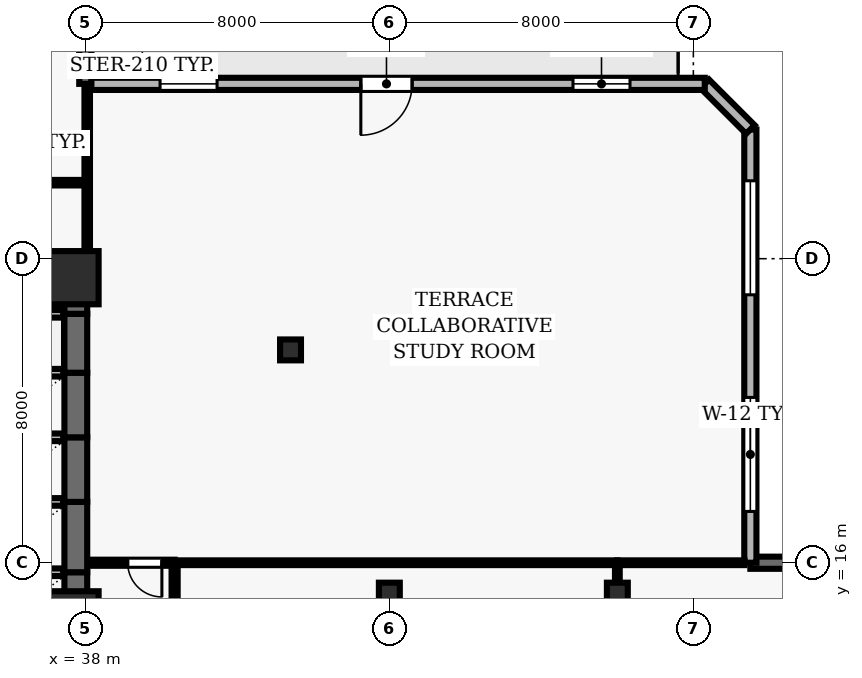
"""IFC4 building model, lengths in metres.
Left out: names, types, materials, properties, quantities, classifications, styles, units other than length and angle.
Written with IfcOpenShell. Run it as: python <this file> out.ifc"""

import sys

from ifc_helpers import new_model, si_unit, direction, frame, frame_2d, origin, origin_2d, place, context, subcontext, project, spatial, rectangle, hollow_rectangle, extrude, element, fill, save


model = new_model("IFC4")
c1 = context("Model", 3, precision=1e-05, world=origin(), true_north=direction((0.0, 1.0)))
c2 = subcontext(c1, "Body", "Model", "MODEL_VIEW")
j1 = project(units=[si_unit("LENGTHUNIT", "METRE"), si_unit("PLANEANGLEUNIT", "RADIAN")], contexts=[c1])
p1 = place(None, origin())
s1 = spatial("IfcSite", under=j1, at=p1, CompositionType="ELEMENT")
p2 = place(p1, origin())
s2 = spatial("IfcBuilding", under=s1, at=p2, CompositionType="ELEMENT")
p3 = place(p2, frame((0.0, 0.0, 31.0)))
s3 = spatial("IfcBuildingStorey", under=s2, at=p3, CompositionType="ELEMENT", Elevation=31.0)
for number, where, z_axis, x_axis in (
    (1, (37.65, 14.55, 0.0), (0.0, 0.0, 1.0), (1.0, 0.0, 0.0)),
    (2, (37.65, 23.5, 0.0), (0.0, 0.0, 1.0), (1.0, 0.0, 0.0)),
):
    element("IfcColumn", number, at=place(p3, frame(where, z_axis=z_axis, x_axis=x_axis)), inside=s3, PredefinedType="COLUMN", context=c2, shape_type="SweptSolid", body=[
        extrude(rectangle(XDim=1.4, YDim=1.4, at=origin_2d()), origin(), (0.0, 0.0, 1.0), 3.9),
    ])
for number, where, z_axis, x_axis in (
    (3, (46.0, 15.2, 0.0), (0.0, 0.0, 1.0), (1.0, 0.0, 0.0)),
    (4, (52.0, 15.2, 0.0), (0.0, 0.0, 1.0), (1.0, 0.0, 0.0)),
    (5, (43.4, 21.6, 0.0), (0.0, 0.0, 1.0), (1.0, 0.0, 0.0)),
):
    element("IfcColumn", number, at=place(p3, frame(where, z_axis=z_axis, x_axis=x_axis)), inside=s3, PredefinedType="COLUMN", context=c2, shape_type="SweptSolid", body=[
        extrude(hollow_rectangle(XDim=0.55, YDim=0.55, WallThickness=0.025, at=origin_2d()), origin(), (0.0, 0.0, 1.0), 3.9),
    ])
p4 = place(p3, frame((73.5, 16.0, 0.0), z_axis=(0.0, 0.0, 1.0), x_axis=(-1.0, 0.0, 0.0)))
e6 = element("IfcWall", 6, at=p4, inside=s3, PredefinedType="SOLIDWALL", context=c2, shape_type="SweptSolid", body=[
    extrude(rectangle(XDim=18.0, YDim=0.32, at=frame_2d((9.0, 0.0))), origin(), (0.0, 0.0, 1.0), 3.69),
])
p5 = place(p4, frame((7.3, 0.0, 0.0)))
e7 = element("IfcOpeningElement", 7, at=p5, cuts=e6, PredefinedType="OPENING", context=c2, shape_type="SweptSolid", body=[
    extrude(rectangle(XDim=1.0, YDim=2.2, at=frame_2d((0.5, 1.1))), frame((0.0, 0.17, 0.0), z_axis=(0.0, -1.0, 0.0), x_axis=(1.0, 0.0, 0.0)), (0.0, 0.0, 1.0), 0.34),
])
p6 = place(p4, frame((1.8, 0.0, 0.9)))
e8 = element("IfcOpeningElement", 8, at=p6, cuts=e6, PredefinedType="OPENING", context=c2, shape_type="SweptSolid", body=[
    extrude(rectangle(XDim=2.4, YDim=2.2, at=frame_2d((1.2, 1.1))), frame((0.0, 0.17, 0.0), z_axis=(0.0, -1.0, 0.0), x_axis=(1.0, 0.0, 0.0)), (0.0, 0.0, 1.0), 0.34),
])
p7 = place(p3, frame((55.5, 16.0, 0.0), z_axis=(0.0, 0.0, 1.0), x_axis=(0.0, 1.0, 0.0)))
e9 = element("IfcWall", 9, at=p7, inside=s3, PredefinedType="SOLIDWALL", context=c2, shape_type="SweptSolid", body=[
    extrude(rectangle(XDim=11.4, YDim=0.32, at=frame_2d((5.7, 0.0))), origin(), (0.0, 0.0, 1.0), 3.69),
])
p8 = place(p7, frame((1.35, 0.0, 0.9)))
e10 = element("IfcOpeningElement", 10, at=p8, cuts=e9, PredefinedType="OPENING", context=c2, shape_type="SweptSolid", body=[
    extrude(rectangle(XDim=3.0, YDim=2.2, at=frame_2d((1.5, 1.1))), frame((0.0, 0.17, 0.0), z_axis=(0.0, -1.0, 0.0), x_axis=(1.0, 0.0, 0.0)), (0.0, 0.0, 1.0), 0.34),
])
p9 = place(p7, frame((7.05, 0.0, 0.9)))
e11 = element("IfcOpeningElement", 11, at=p9, cuts=e9, PredefinedType="OPENING", context=c2, shape_type="SweptSolid", body=[
    extrude(rectangle(XDim=3.0, YDim=2.2, at=frame_2d((1.5, 1.1))), frame((0.0, 0.17, 0.0), z_axis=(0.0, -1.0, 0.0), x_axis=(1.0, 0.0, 0.0)), (0.0, 0.0, 1.0), 0.34),
])
p10 = place(p3, frame((55.5, 27.4, 0.0), z_axis=(0.0, 0.0, 1.0), x_axis=(-0.707034851297, 0.707178703759, 0.0)))
e12 = element("IfcWall", 12, at=p10, inside=s3, PredefinedType="SOLIDWALL", context=c2, shape_type="SweptSolid", body=[
    extrude(rectangle(XDim=1.697, YDim=0.32, at=frame_2d((0.849, 0.0))), origin(), (0.0, 0.0, 1.0), 3.69),
])
p11 = place(p3, frame((54.3, 28.6, 0.0), z_axis=(0.0, 0.0, 1.0), x_axis=(-1.0, 0.0, 0.0)))
e13 = element("IfcWall", 13, at=p11, inside=s3, PredefinedType="SOLIDWALL", context=c2, shape_type="SweptSolid", body=[
    extrude(rectangle(XDim=16.3, YDim=0.32, at=frame_2d((8.15, 0.0))), origin(), (0.0, 0.0, 1.0), 3.69),
])
p12 = place(p11, frame((7.7, 0.0, 0.0)))
e14 = element("IfcOpeningElement", 14, at=p12, cuts=e13, PredefinedType="OPENING", context=c2, shape_type="SweptSolid", body=[
    extrude(rectangle(XDim=1.35, YDim=2.2, at=frame_2d((0.675, 1.1))), frame((0.0, 0.17, 0.0), z_axis=(0.0, -1.0, 0.0), x_axis=(1.0, 0.0, 0.0)), (0.0, 0.0, 1.0), 0.34),
])
p13 = place(p11, frame((1.967, 0.0, 0.9)))
e15 = element("IfcOpeningElement", 15, at=p13, cuts=e13, PredefinedType="OPENING", context=c2, shape_type="SweptSolid", body=[
    extrude(rectangle(XDim=1.5, YDim=1.6, at=frame_2d((0.75, 0.8))), frame((0.0, 0.17, 0.0), z_axis=(0.0, -1.0, 0.0), x_axis=(1.0, 0.0, 0.0)), (0.0, 0.0, 1.0), 0.34),
])
p14 = place(p11, frame((12.833, 0.0, 0.9)))
e16 = element("IfcOpeningElement", 16, at=p14, cuts=e13, PredefinedType="OPENING", context=c2, shape_type="SweptSolid", body=[
    extrude(rectangle(XDim=1.5, YDim=1.6, at=frame_2d((0.75, 0.8))), frame((0.0, 0.17, 0.0), z_axis=(0.0, -1.0, 0.0), x_axis=(1.0, 0.0, 0.0)), (0.0, 0.0, 1.0), 0.34),
])
p15 = place(p3, frame((38.0, 28.6, 0.0), z_axis=(0.0, 0.0, 1.0), x_axis=(0.0, 1.0, 0.0)))
e17 = element("IfcWall", 17, at=p15, inside=s3, PredefinedType="SOLIDWALL", context=c2, shape_type="SweptSolid", body=[
    extrude(rectangle(XDim=22.9, YDim=0.32, at=frame_2d((11.45, 0.0))), origin(), (0.0, 0.0, 1.0), 3.69),
])
p16 = place(p15, frame((9.35, 0.0, 0.0)))
e18 = element("IfcOpeningElement", 18, at=p16, cuts=e17, PredefinedType="OPENING", context=c2, shape_type="SweptSolid", body=[
    extrude(rectangle(XDim=1.0, YDim=2.2, at=frame_2d((0.5, 1.1))), frame((0.0, 0.17, 0.0), z_axis=(0.0, -1.0, 0.0), x_axis=(1.0, 0.0, 0.0)), (0.0, 0.0, 1.0), 0.34),
])
p17 = place(p15, frame((1.962, 0.0, 0.9)))
e19 = element("IfcOpeningElement", 19, at=p17, cuts=e17, PredefinedType="OPENING", context=c2, shape_type="SweptSolid", body=[
    extrude(rectangle(XDim=1.8, YDim=1.6, at=frame_2d((0.9, 0.8))), frame((0.0, 0.17, 0.0), z_axis=(0.0, -1.0, 0.0), x_axis=(1.0, 0.0, 0.0)), (0.0, 0.0, 1.0), 0.34),
])
p18 = place(p15, frame((13.412, 0.0, 0.9)))
e20 = element("IfcOpeningElement", 20, at=p18, cuts=e17, PredefinedType="OPENING", context=c2, shape_type="SweptSolid", body=[
    extrude(rectangle(XDim=1.8, YDim=1.6, at=frame_2d((0.9, 0.8))), frame((0.0, 0.17, 0.0), z_axis=(0.0, -1.0, 0.0), x_axis=(1.0, 0.0, 0.0)), (0.0, 0.0, 1.0), 0.34),
])
p19 = place(p15, frame((19.137, 0.0, 0.9)))
e21 = element("IfcOpeningElement", 21, at=p19, cuts=e17, PredefinedType="OPENING", context=c2, shape_type="SweptSolid", body=[
    extrude(rectangle(XDim=1.8, YDim=1.6, at=frame_2d((0.9, 0.8))), frame((0.0, 0.17, 0.0), z_axis=(0.0, -1.0, 0.0), x_axis=(1.0, 0.0, 0.0)), (0.0, 0.0, 1.0), 0.34),
])
p20 = place(p3, frame((37.75, 13.9, 0.0), z_axis=(0.0, 0.0, 1.0), x_axis=(0.0, 1.0, 0.0)))
e22 = element("IfcWall", 22, at=p20, inside=s3, PredefinedType="SHEAR", context=c2, shape_type="SweptSolid", body=[
    extrude(rectangle(XDim=1.85, YDim=0.6, at=frame_2d((0.925, 0.0))), origin(), (0.0, 0.0, 1.0), 3.69),
])
p21 = place(p3, frame((37.42, 15.75, 0.0), z_axis=(0.0, 0.0, 1.0), x_axis=(-1.0, 0.0, 0.0)))
e23 = element("IfcWall", 23, at=p21, inside=s3, PredefinedType="SOLIDWALL", context=c2, shape_type="SweptSolid", body=[
    extrude(rectangle(XDim=2.14, YDim=0.2, at=frame_2d((1.07, 0.0))), origin(), (0.0, 0.0, 1.0), 3.69),
])
p22 = place(p3, frame((37.75, 15.75, 0.0), z_axis=(0.0, 0.0, 1.0), x_axis=(0.0, 1.0, 0.0)))
e24 = element("IfcWall", 24, at=p22, inside=s3, PredefinedType="SHEAR", context=c2, shape_type="SweptSolid", body=[
    extrude(rectangle(XDim=1.85, YDim=0.6, at=frame_2d((0.925, 0.0))), origin(), (0.0, 0.0, 1.0), 3.69),
])
p23 = place(p3, frame((37.42, 17.6, 0.0), z_axis=(0.0, 0.0, 1.0), x_axis=(-1.0, 0.0, 0.0)))
e25 = element("IfcWall", 25, at=p23, inside=s3, PredefinedType="SOLIDWALL", context=c2, shape_type="SweptSolid", body=[
    extrude(rectangle(XDim=2.14, YDim=0.2, at=frame_2d((1.07, 0.0))), origin(), (0.0, 0.0, 1.0), 3.69),
])
p24 = place(p3, frame((37.75, 17.6, 0.0), z_axis=(0.0, 0.0, 1.0), x_axis=(0.0, 1.0, 0.0)))
e26 = element("IfcWall", 26, at=p24, inside=s3, PredefinedType="SHEAR", context=c2, shape_type="SweptSolid", body=[
    extrude(rectangle(XDim=1.7, YDim=0.6, at=frame_2d((0.85, 0.0))), origin(), (0.0, 0.0, 1.0), 3.69),
])
p25 = place(p3, frame((37.42, 19.3, 0.0), z_axis=(0.0, 0.0, 1.0), x_axis=(-1.0, 0.0, 0.0)))
e27 = element("IfcWall", 27, at=p25, inside=s3, PredefinedType="SOLIDWALL", context=c2, shape_type="SweptSolid", body=[
    extrude(rectangle(XDim=2.14, YDim=0.2, at=frame_2d((1.07, 0.0))), origin(), (0.0, 0.0, 1.0), 3.69),
])
p26 = place(p3, frame((37.75, 19.3, 0.0), z_axis=(0.0, 0.0, 1.0), x_axis=(0.0, 1.0, 0.0)))
e28 = element("IfcWall", 28, at=p26, inside=s3, PredefinedType="SHEAR", context=c2, shape_type="SweptSolid", body=[
    extrude(rectangle(XDim=1.7, YDim=0.6, at=frame_2d((0.85, 0.0))), origin(), (0.0, 0.0, 1.0), 3.69),
])
p27 = place(p3, frame((37.42, 21.0, 0.0), z_axis=(0.0, 0.0, 1.0), x_axis=(-1.0, 0.0, 0.0)))
e29 = element("IfcWall", 29, at=p27, inside=s3, PredefinedType="SOLIDWALL", context=c2, shape_type="SweptSolid", body=[
    extrude(rectangle(XDim=2.14, YDim=0.2, at=frame_2d((1.07, 0.0))), origin(), (0.0, 0.0, 1.0), 3.69),
])
p28 = place(p3, frame((37.75, 21.0, 0.0), z_axis=(0.0, 0.0, 1.0), x_axis=(0.0, 1.0, 0.0)))
e30 = element("IfcWall", 30, at=p28, inside=s3, PredefinedType="SHEAR", context=c2, shape_type="SweptSolid", body=[
    extrude(rectangle(XDim=1.55, YDim=0.6, at=frame_2d((0.775, 0.0))), origin(), (0.0, 0.0, 1.0), 3.69),
])
p29 = place(p3, frame((37.42, 22.55, 0.0), z_axis=(0.0, 0.0, 1.0), x_axis=(-1.0, 0.0, 0.0)))
e31 = element("IfcWall", 31, at=p29, inside=s3, PredefinedType="SOLIDWALL", context=c2, shape_type="SweptSolid", body=[
    extrude(rectangle(XDim=2.14, YDim=0.2, at=frame_2d((1.07, 0.0))), origin(), (0.0, 0.0, 1.0), 3.69),
])
p30 = place(p3, frame((37.75, 22.55, 0.0), z_axis=(0.0, 0.0, 1.0), x_axis=(0.0, 1.0, 0.0)))
e32 = element("IfcWall", 32, at=p30, inside=s3, PredefinedType="SHEAR", context=c2, shape_type="SweptSolid", body=[
    extrude(rectangle(XDim=1.5, YDim=0.6, at=frame_2d((0.75, 0.0))), origin(), (0.0, 0.0, 1.0), 3.69),
])
p31 = place(p3, frame((37.42, 24.05, 0.0), z_axis=(0.0, 0.0, 1.0), x_axis=(-1.0, 0.0, 0.0)))
e33 = element("IfcWall", 33, at=p31, inside=s3, PredefinedType="SOLIDWALL", context=c2, shape_type="SweptSolid", body=[
    extrude(rectangle(XDim=2.14, YDim=0.2, at=frame_2d((1.07, 0.0))), origin(), (0.0, 0.0, 1.0), 3.69),
])
p32 = place(p3, frame((35.15, 26.0, 0.0), z_axis=(0.0, 0.0, 1.0), x_axis=(1.0, 0.0, 0.0)))
e34 = element("IfcWall", 34, at=p32, inside=s3, PredefinedType="PARTITIONING", context=c2, shape_type="SweptSolid", body=[
    extrude(rectangle(XDim=2.7, YDim=0.145, at=frame_2d((1.35, 0.0))), origin(), (0.0, 0.0, 1.0), 3.69),
])
p33 = place(p3, frame((40.35, 16.0, 0.0), z_axis=(0.0, 0.0, 1.0), x_axis=(-1.0, 0.0, 0.0)))
e35 = element("IfcWall", 35, at=p33, inside=s3, PredefinedType="PARTITIONING", context=c2, shape_type="SweptSolid", body=[
    extrude(rectangle(XDim=2.27, YDim=0.16, at=frame_2d((1.135, 0.0))), origin(), (0.0, 0.0, 1.0), 3.69),
])
p34 = place(p33, frame((0.335, 0.0, 0.0)))
e36 = element("IfcOpeningElement", 36, at=p34, cuts=e35, PredefinedType="OPENING", context=c2, shape_type="SweptSolid", body=[
    extrude(rectangle(XDim=0.9, YDim=2.1, at=frame_2d((0.45, 1.05))), frame((0.0, 0.09, 0.0), z_axis=(0.0, -1.0, 0.0), x_axis=(1.0, 0.0, 0.0)), (0.0, 0.0, 1.0), 0.18),
])
p35 = place(p3, frame((52.0, 16.0, 0.0), z_axis=(0.0, 0.0, 1.0), x_axis=(1.0, 0.0, 0.0)))
e37 = element("IfcWall", 37, at=p35, inside=s3, PredefinedType="PARTITIONING", context=c2, shape_type="SweptSolid", body=[
    extrude(rectangle(XDim=3.345, YDim=0.125, at=frame_2d((1.672, 0.0))), origin(), (0.0, 0.0, 1.0), 3.69),
])
p36 = place(p3, frame((52.0, 16.0, 0.0), z_axis=(0.0, 0.0, 1.0), x_axis=(-1.0, 0.0, 0.0)))
e38 = element("IfcWall", 38, at=p36, inside=s3, PredefinedType="PARTITIONING", context=c2, shape_type="SweptSolid", body=[
    extrude(rectangle(XDim=11.65, YDim=0.125, at=frame_2d((5.825, 0.0))), origin(), (0.0, 0.0, 1.0), 3.69),
])
p37 = place(p3, frame((38.05, 28.445, 0.0), z_axis=(0.0, 0.0, 1.0), x_axis=(0.0, -1.0, 0.0)))
e39 = element("IfcWall", 39, at=p37, inside=s3, PredefinedType="PARTITIONING", context=c2, shape_type="SweptSolid", body=[
    extrude(rectangle(XDim=4.395, YDim=0.145, at=frame_2d((2.198, 0.0))), origin(), (0.0, 0.0, 1.0), 2.995),
])
p38 = place(p3, frame((40.35, 10.425, 0.0), z_axis=(0.0, 0.0, 1.0), x_axis=(0.0, 1.0, 0.0)))
e40 = element("IfcWall", 40, at=p38, inside=s3, PredefinedType="PARTITIONING", context=c2, shape_type="SweptSolid", body=[
    extrude(rectangle(XDim=5.5, YDim=0.16, at=frame_2d((2.75, 0.0))), origin(), (0.0, 0.0, 1.0), 3.227),
])
p39 = place(p3, frame((52.0, 10.425, 0.0), z_axis=(0.0, 0.0, 1.0), x_axis=(0.0, 1.0, 0.0)))
e41 = element("IfcWall", 41, at=p39, inside=s3, PredefinedType="PARTITIONING", context=c2, shape_type="SweptSolid", body=[
    extrude(rectangle(XDim=5.518, YDim=0.125, at=frame_2d((2.759, 0.0))), origin(), (0.0, 0.0, 1.0), 2.995),
])
p40 = place(p8, origin())
e42 = element("IfcWindow", 42, at=p40, inside=s3, PartitioningType="SINGLE_PANEL", PredefinedType="WINDOW", context=c2, shape_type="SweptSolid", body=[
    extrude(rectangle(XDim=3.0, YDim=2.2, at=frame_2d((1.5, 1.1))), frame((0.0, 0.03, 0.0), z_axis=(0.0, -1.0, 0.0), x_axis=(1.0, 0.0, 0.0)), (0.0, 0.0, 1.0), 0.06),
])
fill(e10, e42)
p41 = place(p9, origin())
e43 = element("IfcWindow", 43, at=p41, inside=s3, PartitioningType="SINGLE_PANEL", PredefinedType="WINDOW", context=c2, shape_type="SweptSolid", body=[
    extrude(rectangle(XDim=3.0, YDim=2.2, at=frame_2d((1.5, 1.1))), frame((0.0, 0.03, 0.0), z_axis=(0.0, -1.0, 0.0), x_axis=(1.0, 0.0, 0.0)), (0.0, 0.0, 1.0), 0.06),
])
fill(e11, e43)
p42 = place(p12, origin())
e44 = element("IfcDoor", 44, at=p42, inside=s3, OperationType="SINGLE_SWING_RIGHT", PredefinedType="DOOR", context=c2, shape_type="SweptSolid", body=[
    extrude(rectangle(XDim=1.35, YDim=2.2, at=frame_2d((0.675, 1.1))), frame((0.0, 0.025, 0.0), z_axis=(0.0, -1.0, 0.0), x_axis=(1.0, 0.0, 0.0)), (0.0, 0.0, 1.0), 0.05),
])
fill(e14, e44)
p43 = place(p13, origin())
e45 = element("IfcWindow", 45, at=p43, inside=s3, PartitioningType="SINGLE_PANEL", PredefinedType="WINDOW", context=c2, shape_type="SweptSolid", body=[
    extrude(rectangle(XDim=1.5, YDim=1.6, at=frame_2d((0.75, 0.8))), frame((0.0, 0.03, 0.0), z_axis=(0.0, -1.0, 0.0), x_axis=(1.0, 0.0, 0.0)), (0.0, 0.0, 1.0), 0.06),
])
fill(e15, e45)
p44 = place(p14, origin())
e46 = element("IfcWindow", 46, at=p44, inside=s3, PartitioningType="SINGLE_PANEL", PredefinedType="WINDOW", context=c2, shape_type="SweptSolid", body=[
    extrude(rectangle(XDim=1.5, YDim=1.6, at=frame_2d((0.75, 0.8))), frame((0.0, 0.03, 0.0), z_axis=(0.0, -1.0, 0.0), x_axis=(1.0, 0.0, 0.0)), (0.0, 0.0, 1.0), 0.06),
])
fill(e16, e46)
p45 = place(p34, origin())
e47 = element("IfcDoor", 47, at=p45, inside=s3, OperationType="SINGLE_SWING_LEFT", PredefinedType="DOOR", context=c2, shape_type="SweptSolid", body=[
    extrude(rectangle(XDim=0.9, YDim=2.1, at=frame_2d((0.45, 1.05))), frame((0.0, 0.025, 0.0), z_axis=(0.0, -1.0, 0.0), x_axis=(1.0, 0.0, 0.0)), (0.0, 0.0, 1.0), 0.05),
])
fill(e36, e47)
save(model, sys.argv[1])
